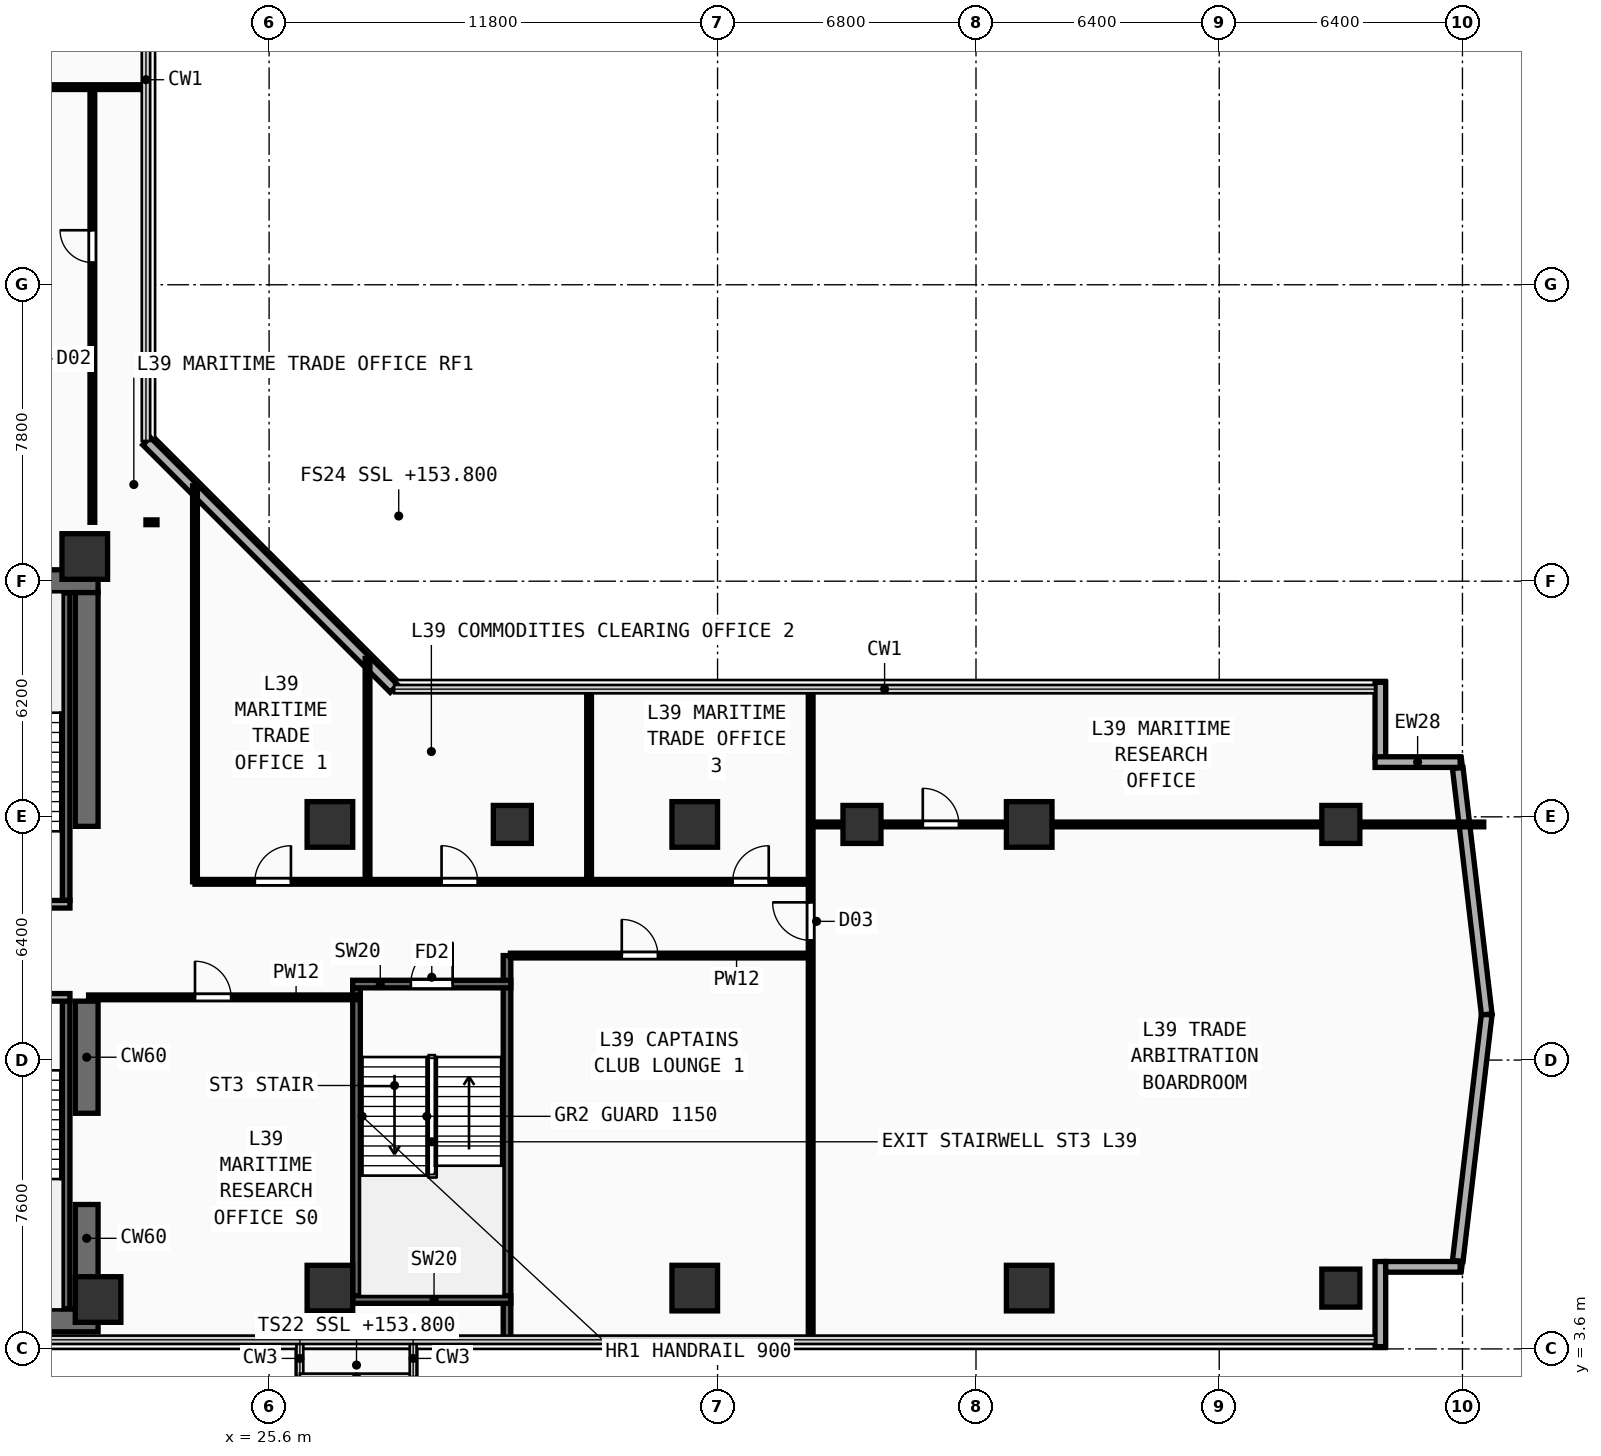
"""IFC4 building model, lengths in metres.
Left out: names, types, materials, properties, quantities, classifications, styles, units other than length and angle.
Written with IfcOpenShell. Run it as: python <this file> out.ifc"""

import sys

from ifc_helpers import new_model, si_unit, direction, frame, frame_2d, origin, origin_2d, place, context, subcontext, project, spatial, rectangle, extrude, element, fill, save


model = new_model("IFC4")
c1 = context("Model", 3, precision=1e-05, world=origin(), true_north=direction((0.0, 1.0)))
c2 = subcontext(c1, "Body", "Model", "MODEL_VIEW")
j1 = project(units=[si_unit("LENGTHUNIT", "METRE"), si_unit("PLANEANGLEUNIT", "RADIAN")], contexts=[c1])
p1 = place(None, origin())
s1 = spatial("IfcSite", under=j1, at=p1, CompositionType="ELEMENT")
p2 = place(p1, origin())
s2 = spatial("IfcBuilding", under=s1, at=p2, CompositionType="ELEMENT")
p3 = place(p2, frame((0.0, 0.0, 153.8)))
s3 = spatial("IfcBuildingStorey", under=s2, at=p3, CompositionType="ELEMENT", Elevation=153.8)
for number, where, z_axis, x_axis in (
    (1, (7.15, 4.35, 0.0), (0.0, 0.0, 1.0), (1.0, 0.0, 0.0)),
    (2, (7.15, 23.8, 0.0), (0.0, 0.0, 1.0), (1.0, 0.0, 0.0)),
):
    element("IfcWall", number, at=place(p3, frame(where, z_axis=z_axis, x_axis=x_axis)), inside=s3, PredefinedType="SHEAR", context=c2, shape_type="SweptSolid", body=[
        extrude(rectangle(XDim=13.95, YDim=0.6, at=frame_2d((6.975, 0.0))), origin(), (0.0, 0.0, 1.0), 3.56),
    ])
p4 = place(p3, frame((20.8, 4.65, 0.0), z_axis=(0.0, 0.0, 1.0), x_axis=(0.0, 1.0, 0.0)))
e3 = element("IfcWall", 3, at=p4, inside=s3, PredefinedType="SHEAR", context=c2, shape_type="SweptSolid", body=[
    extrude(rectangle(XDim=2.75, YDim=0.6, at=frame_2d((1.375, 0.0))), origin(), (0.0, 0.0, 1.0), 3.56),
])
p5 = place(p3, frame((20.8, 9.8, 0.0), z_axis=(0.0, 0.0, 1.0), x_axis=(0.0, 1.0, 0.0)))
e4 = element("IfcWall", 4, at=p5, inside=s3, PredefinedType="SHEAR", context=c2, shape_type="SweptSolid", body=[
    extrude(rectangle(XDim=2.95, YDim=0.6, at=frame_2d((1.475, 0.0))), origin(), (0.0, 0.0, 1.0), 3.56),
])
p6 = place(p3, frame((20.8, 17.35, 0.0), z_axis=(0.0, 0.0, 1.0), x_axis=(0.0, 1.0, 0.0)))
e5 = element("IfcWall", 5, at=p6, inside=s3, PredefinedType="SHEAR", context=c2, shape_type="SweptSolid", body=[
    extrude(rectangle(XDim=6.15, YDim=0.6, at=frame_2d((3.075, 0.0))), origin(), (0.0, 0.0, 1.0), 3.56),
])
for number, where, z_axis, x_axis in (
    (6, (21.1, 4.9, 0.0), (0.0, 0.0, 1.0), (1.0, 0.0, 0.0)),
    (7, (20.75, 24.45, 0.0), (0.0, 0.0, 1.0), (1.0, 0.0, 0.0)),
    (8, (27.2, 5.2, 0.0), (0.0, 0.0, 1.0), (1.0, 0.0, 0.0)),
    (9, (36.8, 5.2, 0.0), (0.0, 0.0, 1.0), (1.0, 0.0, 0.0)),
    (10, (45.6, 5.2, 0.0), (0.0, 0.0, 1.0), (1.0, 0.0, 0.0)),
    (11, (27.2, 17.4, 0.0), (0.0, 0.0, 1.0), (1.0, 0.0, 0.0)),
    (12, (36.8, 17.4, 0.0), (0.0, 0.0, 1.0), (1.0, 0.0, 0.0)),
    (13, (45.6, 17.4, 0.0), (0.0, 0.0, 1.0), (1.0, 0.0, 0.0)),
):
    element("IfcColumn", number, at=place(p3, frame(where, z_axis=z_axis, x_axis=x_axis)), inside=s3, PredefinedType="COLUMN", context=c2, shape_type="SweptSolid", body=[
        extrude(rectangle(XDim=1.2, YDim=1.2, at=origin_2d()), origin(), (0.0, 0.0, 1.0), 3.56),
    ])
for number, where, z_axis, x_axis in (
    (14, (53.8, 5.2, 0.0), (0.0, 0.0, 1.0), (1.0, 0.0, 0.0)),
    (15, (53.8, 17.4, 0.0), (0.0, 0.0, 1.0), (1.0, 0.0, 0.0)),
    (16, (32.0, 17.4, 0.0), (0.0, 0.0, 1.0), (1.0, 0.0, 0.0)),
    (17, (41.2, 17.4, 0.0), (0.0, 0.0, 1.0), (1.0, 0.0, 0.0)),
):
    element("IfcColumn", number, at=place(p3, frame(where, z_axis=z_axis, x_axis=x_axis)), inside=s3, PredefinedType="COLUMN", context=c2, shape_type="SweptSolid", body=[
        extrude(rectangle(XDim=1.0, YDim=1.0, at=origin_2d()), origin(), (0.0, 0.0, 1.0), 3.56),
    ])
p7 = place(p3, frame((54.84, 3.66, 0.0), z_axis=(0.0, 0.0, 1.0), x_axis=(0.0, 1.0, 0.0)))
e18 = element("IfcWall", 18, at=p7, inside=s3, PredefinedType="SOLIDWALL", context=c2, shape_type="SweptSolid", body=[
    extrude(rectangle(XDim=2.24, YDim=0.28, at=frame_2d((1.12, 0.0))), origin(), (0.0, 0.0, 1.0), 3.56),
])
p8 = place(p3, frame((54.98, 5.76, 0.0), z_axis=(0.0, 0.0, 1.0), x_axis=(1.0, 0.0, 0.0)))
e19 = element("IfcWall", 19, at=p8, inside=s3, PredefinedType="SOLIDWALL", context=c2, shape_type="SweptSolid", body=[
    extrude(rectangle(XDim=1.96, YDim=0.28, at=frame_2d((0.98, 0.0))), origin(), (0.0, 0.0, 1.0), 3.56),
])
p9 = place(p3, frame((54.84, 19.165, 0.0), z_axis=(0.0, 0.0, 1.0), x_axis=(0.0, 1.0, 0.0)))
e20 = element("IfcWall", 20, at=p9, inside=s3, PredefinedType="SOLIDWALL", context=c2, shape_type="SweptSolid", body=[
    extrude(rectangle(XDim=1.975, YDim=0.28, at=frame_2d((0.987, 0.0))), origin(), (0.0, 0.0, 1.0), 3.56),
])
p10 = place(p3, frame((54.7, 19.04, 0.0), z_axis=(0.0, 0.0, 1.0), x_axis=(1.0, 0.0, 0.0)))
e21 = element("IfcWall", 21, at=p10, inside=s3, PredefinedType="SOLIDWALL", context=c2, shape_type="SweptSolid", body=[
    extrude(rectangle(XDim=2.24, YDim=0.28, at=frame_2d((1.12, 0.0))), origin(), (0.0, 0.0, 1.0), 3.56),
])
p11 = place(p3, frame((28.885, 20.975, 0.0), z_axis=(0.0, 0.0, 1.0), x_axis=(-0.707106781187, 0.707106781187, 0.0)))
e22 = element("IfcWall", 22, at=p11, inside=s3, PredefinedType="SOLIDWALL", context=c2, shape_type="SweptSolid", body=[
    extrude(rectangle(XDim=9.207, YDim=0.28, at=frame_2d((4.603, 0.0))), origin(), (0.0, 0.0, 1.0), 3.56),
])
for number, where, z_axis, x_axis in (
    (23, (56.876, 5.917, 0.0), (0.0, 0.0, 1.0), (0.117, 0.993, 0.0)),
    (24, (57.639, 12.401, 0.0), (0.0, 0.0, 1.0), (-0.117, 0.993, 0.0)),
):
    element("IfcWall", number, at=place(p3, frame(where, z_axis=z_axis, x_axis=x_axis)), inside=s3, PredefinedType="SOLIDWALL", context=c2, shape_type="SweptSolid", body=[
        extrude(rectangle(XDim=6.527, YDim=0.28, at=frame_2d((3.263, 0.0))), origin(), (0.0, 0.0, 1.0), 3.56),
    ])
p12 = place(p3, frame((20.26, 4.66, 0.0), z_axis=(0.0, 0.0, 1.0), x_axis=(0.0, 1.0, 0.0)))
e25 = element("IfcWall", 25, at=p12, inside=s3, PredefinedType="SHEAR", context=c2, shape_type="SweptSolid", body=[
    extrude(rectangle(XDim=8.09, YDim=0.2, at=frame_2d((4.045, 0.0))), origin(), (0.0, 0.0, 1.0), 3.56),
])
p13 = place(p3, frame((16.4, 12.85, 0.0), z_axis=(0.0, 0.0, 1.0), x_axis=(1.0, 0.0, 0.0)))
e26 = element("IfcWall", 26, at=p13, inside=s3, PredefinedType="PARTITIONING", context=c2, shape_type="SweptSolid", body=[
    extrude(rectangle(XDim=3.96, YDim=0.2, at=frame_2d((1.98, 0.0))), origin(), (0.0, 0.0, 1.0), 3.56),
])
p14 = place(p13, frame((1.304, 0.0, 0.0)))
e27 = element("IfcOpeningElement", 27, at=p14, cuts=e26, PredefinedType="OPENING", context=c2, shape_type="SweptSolid", body=[
    extrude(rectangle(XDim=1.1, YDim=2.2, at=frame_2d((0.55, 1.1))), frame((0.0, 0.11, 0.0), z_axis=(0.0, -1.0, 0.0), x_axis=(1.0, 0.0, 0.0)), (0.0, 0.0, 1.0), 0.22),
])
p15 = place(p3, frame((20.26, 15.4, 0.0), z_axis=(0.0, 0.0, 1.0), x_axis=(0.0, 1.0, 0.0)))
e28 = element("IfcWall", 28, at=p15, inside=s3, PredefinedType="SHEAR", context=c2, shape_type="SweptSolid", body=[
    extrude(rectangle(XDim=8.09, YDim=0.2, at=frame_2d((4.045, 0.0))), origin(), (0.0, 0.0, 1.0), 3.56),
])
p16 = place(p3, frame((16.41, 15.3, 0.0), z_axis=(0.0, 0.0, 1.0), x_axis=(1.0, 0.0, 0.0)))
e29 = element("IfcWall", 29, at=p16, inside=s3, PredefinedType="PARTITIONING", context=c2, shape_type="SweptSolid", body=[
    extrude(rectangle(XDim=3.95, YDim=0.2, at=frame_2d((1.975, 0.0))), origin(), (0.0, 0.0, 1.0), 3.56),
])
p17 = place(p16, frame((1.294, 0.0, 0.0)))
e30 = element("IfcOpeningElement", 30, at=p17, cuts=e29, PredefinedType="OPENING", context=c2, shape_type="SweptSolid", body=[
    extrude(rectangle(XDim=1.1, YDim=2.2, at=frame_2d((0.55, 1.1))), frame((0.0, 0.11, 0.0), z_axis=(0.0, -1.0, 0.0), x_axis=(1.0, 0.0, 0.0)), (0.0, 0.0, 1.0), 0.22),
])
p18 = place(p3, frame((27.9, 5.0, 0.0), z_axis=(0.0, 0.0, 1.0), x_axis=(0.0, 1.0, 0.0)))
e31 = element("IfcWall", 31, at=p18, inside=s3, PredefinedType="SHEAR", context=c2, shape_type="SweptSolid", body=[
    extrude(rectangle(XDim=8.1, YDim=0.2, at=frame_2d((4.05, 0.0))), origin(), (0.0, 0.0, 1.0), 3.56),
])
p19 = place(p3, frame((31.86, 3.84, 0.0), z_axis=(0.0, 0.0, 1.0), x_axis=(0.0, 1.0, 0.0)))
e32 = element("IfcWall", 32, at=p19, inside=s3, PredefinedType="SHEAR", context=c2, shape_type="SweptSolid", body=[
    extrude(rectangle(XDim=10.11, YDim=0.2, at=frame_2d((5.055, 0.0))), origin(), (0.0, 0.0, 1.0), 3.56),
])
p20 = place(p3, frame((27.8, 4.9, 0.0), z_axis=(0.0, 0.0, 1.0), x_axis=(1.0, 0.0, 0.0)))
e33 = element("IfcWall", 33, at=p20, inside=s3, PredefinedType="SHEAR", context=c2, shape_type="SweptSolid", body=[
    extrude(rectangle(XDim=4.16, YDim=0.2, at=frame_2d((2.08, 0.0))), origin(), (0.0, 0.0, 1.0), 3.56),
])
p21 = place(p3, frame((27.8, 13.2, 0.0), z_axis=(0.0, 0.0, 1.0), x_axis=(1.0, 0.0, 0.0)))
e34 = element("IfcWall", 34, at=p21, inside=s3, PredefinedType="SHEAR", context=c2, shape_type="SweptSolid", body=[
    extrude(rectangle(XDim=4.16, YDim=0.2, at=frame_2d((2.08, 0.0))), origin(), (0.0, 0.0, 1.0), 3.56),
])
p22 = place(p21, frame((1.53, 0.0, 0.0)))
e35 = element("IfcOpeningElement", 35, at=p22, cuts=e34, PredefinedType="OPENING", context=c2, shape_type="SweptSolid", body=[
    extrude(rectangle(XDim=1.1, YDim=2.2, at=frame_2d((0.55, 1.1))), frame((0.0, 0.11, 0.0), z_axis=(0.0, -1.0, 0.0), x_axis=(1.0, 0.0, 0.0)), (0.0, 0.0, 1.0), 0.22),
])
p23 = place(p3, frame((20.85, 12.85, 0.0), z_axis=(0.0, 0.0, 1.0), x_axis=(1.0, 0.0, 0.0)))
e36 = element("IfcWall", 36, at=p23, inside=s3, PredefinedType="PARTITIONING", context=c2, shape_type="SweptSolid", body=[
    extrude(rectangle(XDim=7.05, YDim=0.125, at=frame_2d((3.525, 0.0))), origin(), (0.0, 0.0, 1.0), 3.56),
])
p24 = place(p23, frame((2.8, 0.0, 0.0)))
e37 = element("IfcOpeningElement", 37, at=p24, cuts=e36, PredefinedType="OPENING", context=c2, shape_type="SweptSolid", body=[
    extrude(rectangle(XDim=0.95, YDim=2.15, at=frame_2d((0.475, 1.075))), frame((0.0, 0.073, 0.0), z_axis=(0.0, -1.0, 0.0), x_axis=(1.0, 0.0, 0.0)), (0.0, 0.0, 1.0), 0.145),
])
p25 = place(p3, frame((20.95, 25.35, 0.0), z_axis=(0.0, 0.0, 1.0), x_axis=(0.0, 1.0, 0.0)))
e38 = element("IfcWall", 38, at=p25, inside=s3, PredefinedType="PARTITIONING", context=c2, shape_type="SweptSolid", body=[
    extrude(rectangle(XDim=11.45, YDim=0.125, at=frame_2d((5.725, 0.0))), origin(), (0.0, 0.0, 1.0), 3.56),
])
p26 = place(p25, frame((6.835, 0.0, 0.0)))
e39 = element("IfcOpeningElement", 39, at=p26, cuts=e38, PredefinedType="OPENING", context=c2, shape_type="SweptSolid", body=[
    extrude(rectangle(XDim=0.85, YDim=2.15, at=frame_2d((0.425, 1.075))), frame((0.0, 0.073, 0.0), z_axis=(0.0, -1.0, 0.0), x_axis=(1.0, 0.0, 0.0)), (0.0, 0.0, 1.0), 0.145),
])
p27 = place(p3, frame((22.65, 25.35, 0.0), z_axis=(0.0, 0.0, 1.0), x_axis=(-1.0, 0.0, 0.0)))
e40 = element("IfcWall", 40, at=p27, inside=s3, PredefinedType="PARTITIONING", context=c2, shape_type="SweptSolid", body=[
    extrude(rectangle(XDim=0.29, YDim=0.125, at=frame_2d((0.145, 0.0))), origin(), (0.0, 0.0, 1.0), 3.56),
])
p28 = place(p3, frame((15.54, 36.8, 0.0), z_axis=(0.0, 0.0, 1.0), x_axis=(1.0, 0.0, 0.0)))
e41 = element("IfcWall", 41, at=p28, inside=s3, PredefinedType="PARTITIONING", context=c2, shape_type="SweptSolid", body=[
    extrude(rectangle(XDim=6.82, YDim=0.125, at=frame_2d((3.41, 0.0))), origin(), (0.0, 0.0, 1.0), 3.56),
])
p29 = place(p3, frame((31.95, 13.95, 0.0), z_axis=(0.0, 0.0, 1.0), x_axis=(1.0, 0.0, 0.0)))
e42 = element("IfcWall", 42, at=p29, inside=s3, PredefinedType="PARTITIONING", context=c2, shape_type="SweptSolid", body=[
    extrude(rectangle(XDim=7.9, YDim=0.125, at=frame_2d((3.95, 0.0))), origin(), (0.0, 0.0, 1.0), 3.56),
])
p30 = place(p29, frame((2.93, 0.0, 0.0)))
e43 = element("IfcOpeningElement", 43, at=p30, cuts=e42, PredefinedType="OPENING", context=c2, shape_type="SweptSolid", body=[
    extrude(rectangle(XDim=0.95, YDim=2.15, at=frame_2d((0.475, 1.075))), frame((0.0, 0.073, 0.0), z_axis=(0.0, -1.0, 0.0), x_axis=(1.0, 0.0, 0.0)), (0.0, 0.0, 1.0), 0.145),
])
p31 = place(p3, frame((39.85, 3.84, 0.0), z_axis=(0.0, 0.0, 1.0), x_axis=(0.0, 1.0, 0.0)))
e44 = element("IfcWall", 44, at=p31, inside=s3, PredefinedType="PARTITIONING", context=c2, shape_type="SweptSolid", body=[
    extrude(rectangle(XDim=17.12, YDim=0.125, at=frame_2d((8.56, 0.0))), origin(), (0.0, 0.0, 1.0), 3.56),
])
p32 = place(p31, frame((10.51, 0.0, 0.0)))
e45 = element("IfcOpeningElement", 45, at=p32, cuts=e44, PredefinedType="OPENING", context=c2, shape_type="SweptSolid", body=[
    extrude(rectangle(XDim=1.0, YDim=2.2, at=frame_2d((0.5, 1.1))), frame((0.0, 0.073, 0.0), z_axis=(0.0, -1.0, 0.0), x_axis=(1.0, 0.0, 0.0)), (0.0, 0.0, 1.0), 0.145),
])
p33 = place(p3, frame((39.85, 17.4, 0.0), z_axis=(0.0, 0.0, 1.0), x_axis=(1.0, 0.0, 0.0)))
e46 = element("IfcWall", 46, at=p33, inside=s3, PredefinedType="PARTITIONING", context=c2, shape_type="SweptSolid", body=[
    extrude(rectangle(XDim=17.71, YDim=0.125, at=frame_2d((8.855, 0.0))), origin(), (0.0, 0.0, 1.0), 3.2),
])
p34 = place(p33, frame((2.95, 0.0, 0.0)))
e47 = element("IfcOpeningElement", 47, at=p34, cuts=e46, PredefinedType="OPENING", context=c2, shape_type="SweptSolid", body=[
    extrude(rectangle(XDim=0.95, YDim=2.15, at=frame_2d((0.475, 1.075))), frame((0.0, 0.073, 0.0), z_axis=(0.0, -1.0, 0.0), x_axis=(1.0, 0.0, 0.0)), (0.0, 0.0, 1.0), 0.145),
])
p35 = place(p3, frame((23.65, 15.89, 0.0), z_axis=(0.0, 0.0, 1.0), x_axis=(0.0, 1.0, 0.0)))
e48 = element("IfcWall", 48, at=p35, inside=s3, PredefinedType="PARTITIONING", context=c2, shape_type="SweptSolid", body=[
    extrude(rectangle(XDim=10.42, YDim=0.125, at=frame_2d((5.21, 0.0))), origin(), (0.0, 0.0, 1.0), 3.56),
])
p36 = place(p3, frame((23.65, 15.89, 0.0), z_axis=(0.0, 0.0, 1.0), x_axis=(1.0, 0.0, 0.0)))
e49 = element("IfcWall", 49, at=p36, inside=s3, PredefinedType="PARTITIONING", context=c2, shape_type="SweptSolid", body=[
    extrude(rectangle(XDim=16.2, YDim=0.125, at=frame_2d((8.1, 0.0))), origin(), (0.0, 0.0, 1.0), 3.16),
])
p37 = place(p36, frame((1.575, 0.0, 0.0)))
e50 = element("IfcOpeningElement", 50, at=p37, cuts=e49, PredefinedType="OPENING", context=c2, shape_type="SweptSolid", body=[
    extrude(rectangle(XDim=0.95, YDim=2.15, at=frame_2d((0.475, 1.075))), frame((0.0, 0.073, 0.0), z_axis=(0.0, -1.0, 0.0), x_axis=(1.0, 0.0, 0.0)), (0.0, 0.0, 1.0), 0.145),
])
p38 = place(p36, frame((6.488, 0.0, 0.0)))
e51 = element("IfcOpeningElement", 51, at=p38, cuts=e49, PredefinedType="OPENING", context=c2, shape_type="SweptSolid", body=[
    extrude(rectangle(XDim=0.95, YDim=2.15, at=frame_2d((0.475, 1.075))), frame((0.0, 0.073, 0.0), z_axis=(0.0, -1.0, 0.0), x_axis=(1.0, 0.0, 0.0)), (0.0, 0.0, 1.0), 0.145),
])
p39 = place(p36, frame((14.146, 0.0, 0.0)))
e52 = element("IfcOpeningElement", 52, at=p39, cuts=e49, PredefinedType="OPENING", context=c2, shape_type="SweptSolid", body=[
    extrude(rectangle(XDim=0.95, YDim=2.15, at=frame_2d((0.475, 1.075))), frame((0.0, 0.073, 0.0), z_axis=(0.0, -1.0, 0.0), x_axis=(1.0, 0.0, 0.0)), (0.0, 0.0, 1.0), 0.145),
])
p40 = place(p3, frame((28.19, 15.89, 0.0), z_axis=(0.0, 0.0, 1.0), x_axis=(0.0, 1.0, 0.0)))
e53 = element("IfcWall", 53, at=p40, inside=s3, PredefinedType="PARTITIONING", context=c2, shape_type="SweptSolid", body=[
    extrude(rectangle(XDim=5.88, YDim=0.125, at=frame_2d((2.94, 0.0))), origin(), (0.0, 0.0, 1.0), 3.56),
])
p41 = place(p3, frame((34.02, 15.89, 0.0), z_axis=(0.0, 0.0, 1.0), x_axis=(0.0, 1.0, 0.0)))
e54 = element("IfcWall", 54, at=p41, inside=s3, PredefinedType="PARTITIONING", context=c2, shape_type="SweptSolid", body=[
    extrude(rectangle(XDim=5.07, YDim=0.125, at=frame_2d((2.535, 0.0))), origin(), (0.0, 0.0, 1.0), 3.56),
])
p42 = place(p22, frame((1.1, 0.0, 0.0), z_axis=(0.0, 0.0, 1.0), x_axis=(-1.0, 0.0, 0.0)))
e55 = element("IfcDoor", 55, at=p42, inside=s3, OperationType="SINGLE_SWING_LEFT", PredefinedType="DOOR", context=c2, shape_type="SweptSolid", body=[
    extrude(rectangle(XDim=1.1, YDim=2.2, at=frame_2d((0.55, 1.1))), frame((0.0, 0.025, 0.0), z_axis=(0.0, -1.0, 0.0), x_axis=(1.0, 0.0, 0.0)), (0.0, 0.0, 1.0), 0.05),
])
fill(e35, e55)
p43 = place(p24, origin())
e56 = element("IfcDoor", 56, at=p43, inside=s3, OperationType="SINGLE_SWING_LEFT", PredefinedType="DOOR", context=c2, shape_type="SweptSolid", body=[
    extrude(rectangle(XDim=0.95, YDim=2.15, at=frame_2d((0.475, 1.075))), frame((0.0, 0.025, 0.0), z_axis=(0.0, -1.0, 0.0), x_axis=(1.0, 0.0, 0.0)), (0.0, 0.0, 1.0), 0.05),
])
fill(e37, e56)
p44 = place(p26, origin())
e57 = element("IfcDoor", 57, at=p44, inside=s3, OperationType="SINGLE_SWING_RIGHT", PredefinedType="DOOR", context=c2, shape_type="SweptSolid", body=[
    extrude(rectangle(XDim=0.85, YDim=2.15, at=frame_2d((0.425, 1.075))), frame((0.0, 0.025, 0.0), z_axis=(0.0, -1.0, 0.0), x_axis=(1.0, 0.0, 0.0)), (0.0, 0.0, 1.0), 0.05),
])
fill(e39, e57)
p45 = place(p30, origin())
e58 = element("IfcDoor", 58, at=p45, inside=s3, OperationType="SINGLE_SWING_LEFT", PredefinedType="DOOR", context=c2, shape_type="SweptSolid", body=[
    extrude(rectangle(XDim=0.95, YDim=2.15, at=frame_2d((0.475, 1.075))), frame((0.0, 0.025, 0.0), z_axis=(0.0, -1.0, 0.0), x_axis=(1.0, 0.0, 0.0)), (0.0, 0.0, 1.0), 0.05),
])
fill(e43, e58)
p46 = place(p32, origin())
e59 = element("IfcDoor", 59, at=p46, inside=s3, OperationType="SINGLE_SWING_RIGHT", PredefinedType="DOOR", context=c2, shape_type="SweptSolid", body=[
    extrude(rectangle(XDim=1.0, YDim=2.2, at=frame_2d((0.5, 1.1))), frame((0.0, 0.025, 0.0), z_axis=(0.0, -1.0, 0.0), x_axis=(1.0, 0.0, 0.0)), (0.0, 0.0, 1.0), 0.05),
])
fill(e45, e59)
p47 = place(p34, origin())
e60 = element("IfcDoor", 60, at=p47, inside=s3, OperationType="SINGLE_SWING_LEFT", PredefinedType="DOOR", context=c2, shape_type="SweptSolid", body=[
    extrude(rectangle(XDim=0.95, YDim=2.15, at=frame_2d((0.475, 1.075))), frame((0.0, 0.025, 0.0), z_axis=(0.0, -1.0, 0.0), x_axis=(1.0, 0.0, 0.0)), (0.0, 0.0, 1.0), 0.05),
])
fill(e47, e60)
p48 = place(p37, origin())
e61 = element("IfcDoor", 61, at=p48, inside=s3, OperationType="SINGLE_SWING_RIGHT", PredefinedType="DOOR", context=c2, shape_type="SweptSolid", body=[
    extrude(rectangle(XDim=0.95, YDim=2.15, at=frame_2d((0.475, 1.075))), frame((0.0, 0.025, 0.0), z_axis=(0.0, -1.0, 0.0), x_axis=(1.0, 0.0, 0.0)), (0.0, 0.0, 1.0), 0.05),
])
fill(e50, e61)
p49 = place(p38, origin())
e62 = element("IfcDoor", 62, at=p49, inside=s3, OperationType="SINGLE_SWING_LEFT", PredefinedType="DOOR", context=c2, shape_type="SweptSolid", body=[
    extrude(rectangle(XDim=0.95, YDim=2.15, at=frame_2d((0.475, 1.075))), frame((0.0, 0.025, 0.0), z_axis=(0.0, -1.0, 0.0), x_axis=(1.0, 0.0, 0.0)), (0.0, 0.0, 1.0), 0.05),
])
fill(e51, e62)
p50 = place(p39, origin())
e63 = element("IfcDoor", 63, at=p50, inside=s3, OperationType="SINGLE_SWING_RIGHT", PredefinedType="DOOR", context=c2, shape_type="SweptSolid", body=[
    extrude(rectangle(XDim=0.95, YDim=2.15, at=frame_2d((0.475, 1.075))), frame((0.0, 0.025, 0.0), z_axis=(0.0, -1.0, 0.0), x_axis=(1.0, 0.0, 0.0)), (0.0, 0.0, 1.0), 0.05),
])
fill(e52, e63)
save(model, sys.argv[1])
